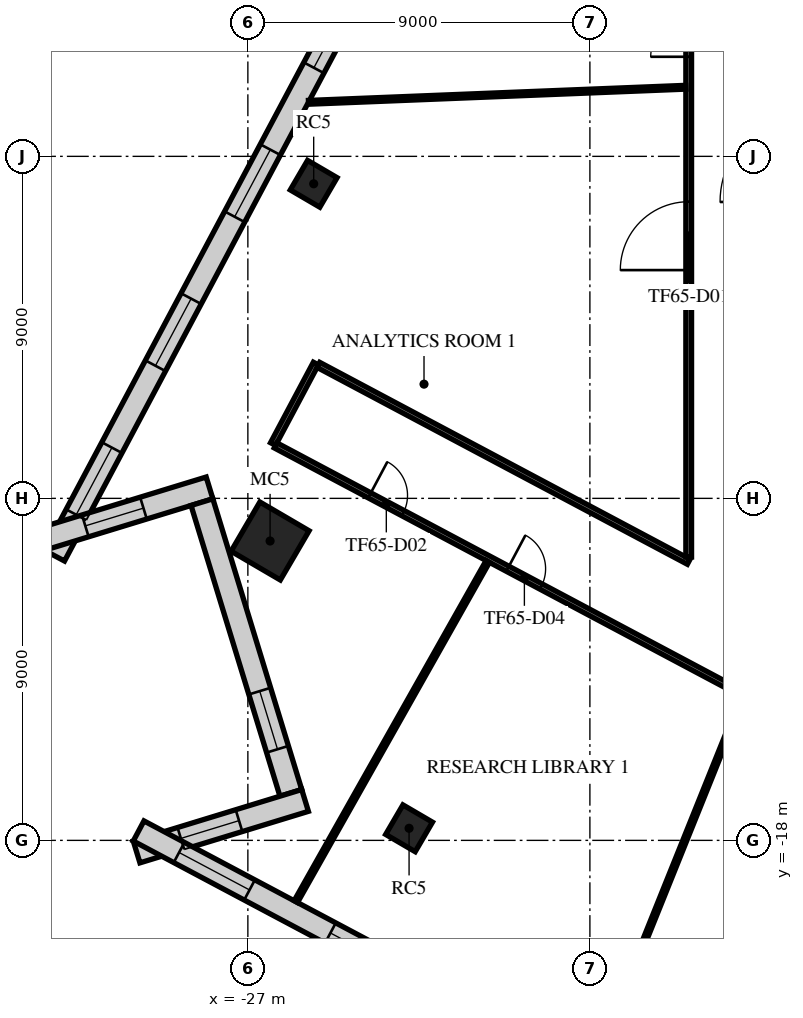
"""IFC4 building model, lengths in metres.
Left out: names, types, materials, properties, quantities, classifications, styles, units other than length and angle.
Written with IfcOpenShell. Run it as: python <this file> out.ifc"""

import sys

from ifc_helpers import new_model, si_unit, direction, frame, frame_2d, origin, origin_2d, place, context, subcontext, project, spatial, rectangle, extrude, element, fill, save


model = new_model("IFC4")
c1 = context("Model", 3, precision=1e-05, world=origin(), true_north=direction((0.0, 1.0)))
c2 = subcontext(c1, "Body", "Model", "MODEL_VIEW")
j1 = project(units=[si_unit("LENGTHUNIT", "METRE"), si_unit("PLANEANGLEUNIT", "RADIAN")], contexts=[c1])
p1 = place(None, origin())
s1 = spatial("IfcSite", under=j1, at=p1, CompositionType="ELEMENT")
p2 = place(p1, origin())
s2 = spatial("IfcBuilding", under=s1, at=p2, CompositionType="ELEMENT")
p3 = place(p2, frame((0.0, 0.0, 274.9)))
s3 = spatial("IfcBuildingStorey", under=s2, at=p3, CompositionType="ELEMENT", Elevation=274.9)
p4 = place(p3, frame((-25.268, -0.722, 0.0), z_axis=(0.0, 0.0, 1.0), x_axis=(0.504643651291, 0.863327739165, 0.0)))
e1 = element("IfcColumn", 1, at=p4, inside=s3, PredefinedType="COLUMN", context=c2, shape_type="SweptSolid", body=[
    extrude(rectangle(XDim=0.9, YDim=0.9, at=origin_2d()), origin(), (0.0, 0.0, 1.0), 4.0),
])
p5 = place(p3, frame((-26.415, -10.122, 0.0), z_axis=(0.0, 0.0, 1.0), x_axis=(0.504643651291, 0.863327739165, 0.0)))
e2 = element("IfcColumn", 2, at=p5, inside=s3, PredefinedType="COLUMN", context=c2, shape_type="SweptSolid", body=[
    extrude(rectangle(XDim=1.5, YDim=1.5, at=origin_2d()), origin(), (0.0, 0.0, 1.0), 4.0),
])
p6 = place(p3, frame((-22.758, -17.682, 0.0), z_axis=(0.0, 0.0, 1.0), x_axis=(0.504643651291, 0.863327739165, 0.0)))
e3 = element("IfcColumn", 3, at=p6, inside=s3, PredefinedType="COLUMN", context=c2, shape_type="SweptSolid", body=[
    extrude(rectangle(XDim=0.9, YDim=0.9, at=origin_2d()), origin(), (0.0, 0.0, 1.0), 4.0),
])
p7 = place(p3, frame((-9.159, 32.618, 0.0), z_axis=(0.0, 0.0, 1.0), x_axis=(-0.469470468388, -0.88294817476, 0.0)))
e4 = element("IfcWall", 4, at=p7, inside=s3, PredefinedType="STANDARD", context=c2, shape_type="SweptSolid", body=[
    extrude(rectangle(XDim=48.843, YDim=0.6, at=frame_2d((24.422, 0.0))), origin(), (0.0, 0.0, 1.0), 3.64),
])
p8 = place(p7, frame((1.22, 0.0, 0.9)))
e5 = element("IfcOpeningElement", 5, at=p8, cuts=e4, PredefinedType="OPENING", context=c2, shape_type="SweptSolid", body=[
    extrude(rectangle(XDim=2.0, YDim=2.1, at=frame_2d((1.0, 1.05))), frame((0.0, 0.31, 0.0), z_axis=(0.0, -1.0, 0.0), x_axis=(1.0, 0.0, 0.0)), (0.0, 0.0, 1.0), 0.62),
])
p9 = place(p7, frame((5.66, 0.0, 0.9)))
e6 = element("IfcOpeningElement", 6, at=p9, cuts=e4, PredefinedType="OPENING", context=c2, shape_type="SweptSolid", body=[
    extrude(rectangle(XDim=2.0, YDim=2.1, at=frame_2d((1.0, 1.05))), frame((0.0, 0.31, 0.0), z_axis=(0.0, -1.0, 0.0), x_axis=(1.0, 0.0, 0.0)), (0.0, 0.0, 1.0), 0.62),
])
p10 = place(p7, frame((10.101, 0.0, 0.9)))
e7 = element("IfcOpeningElement", 7, at=p10, cuts=e4, PredefinedType="OPENING", context=c2, shape_type="SweptSolid", body=[
    extrude(rectangle(XDim=2.0, YDim=2.1, at=frame_2d((1.0, 1.05))), frame((0.0, 0.31, 0.0), z_axis=(0.0, -1.0, 0.0), x_axis=(1.0, 0.0, 0.0)), (0.0, 0.0, 1.0), 0.62),
])
p11 = place(p7, frame((14.541, 0.0, 0.9)))
e8 = element("IfcOpeningElement", 8, at=p11, cuts=e4, PredefinedType="OPENING", context=c2, shape_type="SweptSolid", body=[
    extrude(rectangle(XDim=2.0, YDim=2.1, at=frame_2d((1.0, 1.05))), frame((0.0, 0.31, 0.0), z_axis=(0.0, -1.0, 0.0), x_axis=(1.0, 0.0, 0.0)), (0.0, 0.0, 1.0), 0.62),
])
p12 = place(p7, frame((18.981, 0.0, 0.9)))
e9 = element("IfcOpeningElement", 9, at=p12, cuts=e4, PredefinedType="OPENING", context=c2, shape_type="SweptSolid", body=[
    extrude(rectangle(XDim=2.0, YDim=2.1, at=frame_2d((1.0, 1.05))), frame((0.0, 0.31, 0.0), z_axis=(0.0, -1.0, 0.0), x_axis=(1.0, 0.0, 0.0)), (0.0, 0.0, 1.0), 0.62),
])
p13 = place(p7, frame((23.422, 0.0, 0.9)))
e10 = element("IfcOpeningElement", 10, at=p13, cuts=e4, PredefinedType="OPENING", context=c2, shape_type="SweptSolid", body=[
    extrude(rectangle(XDim=2.0, YDim=2.1, at=frame_2d((1.0, 1.05))), frame((0.0, 0.31, 0.0), z_axis=(0.0, -1.0, 0.0), x_axis=(1.0, 0.0, 0.0)), (0.0, 0.0, 1.0), 0.62),
])
p14 = place(p7, frame((27.862, 0.0, 0.9)))
e11 = element("IfcOpeningElement", 11, at=p14, cuts=e4, PredefinedType="OPENING", context=c2, shape_type="SweptSolid", body=[
    extrude(rectangle(XDim=2.0, YDim=2.1, at=frame_2d((1.0, 1.05))), frame((0.0, 0.31, 0.0), z_axis=(0.0, -1.0, 0.0), x_axis=(1.0, 0.0, 0.0)), (0.0, 0.0, 1.0), 0.62),
])
p15 = place(p7, frame((32.302, 0.0, 0.9)))
e12 = element("IfcOpeningElement", 12, at=p15, cuts=e4, PredefinedType="OPENING", context=c2, shape_type="SweptSolid", body=[
    extrude(rectangle(XDim=2.0, YDim=2.1, at=frame_2d((1.0, 1.05))), frame((0.0, 0.31, 0.0), z_axis=(0.0, -1.0, 0.0), x_axis=(1.0, 0.0, 0.0)), (0.0, 0.0, 1.0), 0.62),
])
p16 = place(p7, frame((36.742, 0.0, 0.9)))
e13 = element("IfcOpeningElement", 13, at=p16, cuts=e4, PredefinedType="OPENING", context=c2, shape_type="SweptSolid", body=[
    extrude(rectangle(XDim=2.0, YDim=2.1, at=frame_2d((1.0, 1.05))), frame((0.0, 0.31, 0.0), z_axis=(0.0, -1.0, 0.0), x_axis=(1.0, 0.0, 0.0)), (0.0, 0.0, 1.0), 0.62),
])
p17 = place(p7, frame((41.183, 0.0, 0.9)))
e14 = element("IfcOpeningElement", 14, at=p17, cuts=e4, PredefinedType="OPENING", context=c2, shape_type="SweptSolid", body=[
    extrude(rectangle(XDim=2.0, YDim=2.1, at=frame_2d((1.0, 1.05))), frame((0.0, 0.31, 0.0), z_axis=(0.0, -1.0, 0.0), x_axis=(1.0, 0.0, 0.0)), (0.0, 0.0, 1.0), 0.62),
])
p18 = place(p7, frame((45.623, 0.0, 0.9)))
e15 = element("IfcOpeningElement", 15, at=p18, cuts=e4, PredefinedType="OPENING", context=c2, shape_type="SweptSolid", body=[
    extrude(rectangle(XDim=2.0, YDim=2.1, at=frame_2d((1.0, 1.05))), frame((0.0, 0.31, 0.0), z_axis=(0.0, -1.0, 0.0), x_axis=(1.0, 0.0, 0.0)), (0.0, 0.0, 1.0), 0.62),
])
p19 = place(p3, frame((-32.442, -10.08, 0.0), z_axis=(0.0, 0.0, 1.0), x_axis=(0.956306994041, 0.2923643842, 0.0)))
e16 = element("IfcWall", 16, at=p19, inside=s3, PredefinedType="STANDARD", context=c2, shape_type="SweptSolid", body=[
    extrude(rectangle(XDim=4.635, YDim=0.6, at=frame_2d((2.318, 0.0))), origin(), (0.0, 0.0, 1.0), 3.64),
])
p20 = place(p19, frame((1.218, 0.0, 0.9)))
e17 = element("IfcOpeningElement", 17, at=p20, cuts=e16, PredefinedType="OPENING", context=c2, shape_type="SweptSolid", body=[
    extrude(rectangle(XDim=1.6, YDim=2.1, at=frame_2d((0.8, 1.05))), frame((0.0, 0.31, 0.0), z_axis=(0.0, -1.0, 0.0), x_axis=(1.0, 0.0, 0.0)), (0.0, 0.0, 1.0), 0.62),
])
p21 = place(p3, frame((-28.208, -9.1, 0.0), z_axis=(0.0, 0.0, 1.0), x_axis=(0.292389102139, -0.956299436866, 0.0)))
e18 = element("IfcWall", 18, at=p21, inside=s3, PredefinedType="STANDARD", context=c2, shape_type="SweptSolid", body=[
    extrude(rectangle(XDim=8.0, YDim=0.6, at=frame_2d((4.0, 0.0))), origin(), (0.0, 0.0, 1.0), 3.64),
])
p22 = place(p21, frame((5.2, 0.0, 0.9)))
e19 = element("IfcOpeningElement", 19, at=p22, cuts=e18, PredefinedType="OPENING", context=c2, shape_type="SweptSolid", body=[
    extrude(rectangle(XDim=1.6, YDim=2.1, at=frame_2d((0.8, 1.05))), frame((0.0, 0.31, 0.0), z_axis=(0.0, -1.0, 0.0), x_axis=(1.0, 0.0, 0.0)), (0.0, 0.0, 1.0), 0.62),
])
p23 = place(p3, frame((-25.495, -16.949, 0.0), z_axis=(0.0, 0.0, 1.0), x_axis=(-0.956292267386, -0.292412549899, 0.0)))
e20 = element("IfcWall", 20, at=p23, inside=s3, PredefinedType="STANDARD", context=c2, shape_type="SweptSolid", body=[
    extrude(rectangle(XDim=4.635, YDim=0.6, at=frame_2d((2.318, 0.0))), origin(), (0.0, 0.0, 1.0), 3.64),
])
p24 = place(p23, frame((1.818, 0.0, 0.9)))
e21 = element("IfcOpeningElement", 21, at=p24, cuts=e20, PredefinedType="OPENING", context=c2, shape_type="SweptSolid", body=[
    extrude(rectangle(XDim=1.6, YDim=2.1, at=frame_2d((0.8, 1.05))), frame((0.0, 0.31, 0.0), z_axis=(0.0, -1.0, 0.0), x_axis=(1.0, 0.0, 0.0)), (0.0, 0.0, 1.0), 0.62),
])
p25 = place(p3, frame((-29.875, -17.753, 0.0), z_axis=(0.0, 0.0, 1.0), x_axis=(0.882945726539, -0.469475072806, 0.0)))
e22 = element("IfcWall", 22, at=p25, inside=s3, PredefinedType="STANDARD", context=c2, shape_type="SweptSolid", body=[
    extrude(rectangle(XDim=36.086, YDim=0.6, at=frame_2d((18.043, 0.0))), origin(), (0.0, 0.0, 1.0), 3.64),
])
p26 = place(p25, frame((1.205, 0.0, 0.9)))
e23 = element("IfcOpeningElement", 23, at=p26, cuts=e22, PredefinedType="OPENING", context=c2, shape_type="SweptSolid", body=[
    extrude(rectangle(XDim=2.1, YDim=2.1, at=frame_2d((1.05, 1.05))), frame((0.0, 0.31, 0.0), z_axis=(0.0, -1.0, 0.0), x_axis=(1.0, 0.0, 0.0)), (0.0, 0.0, 1.0), 0.62),
])
p27 = place(p25, frame((5.716, 0.0, 0.9)))
e24 = element("IfcOpeningElement", 24, at=p27, cuts=e22, PredefinedType="OPENING", context=c2, shape_type="SweptSolid", body=[
    extrude(rectangle(XDim=2.1, YDim=2.1, at=frame_2d((1.05, 1.05))), frame((0.0, 0.31, 0.0), z_axis=(0.0, -1.0, 0.0), x_axis=(1.0, 0.0, 0.0)), (0.0, 0.0, 1.0), 0.62),
])
p28 = place(p25, frame((10.227, 0.0, 0.9)))
e25 = element("IfcOpeningElement", 25, at=p28, cuts=e22, PredefinedType="OPENING", context=c2, shape_type="SweptSolid", body=[
    extrude(rectangle(XDim=2.1, YDim=2.1, at=frame_2d((1.05, 1.05))), frame((0.0, 0.31, 0.0), z_axis=(0.0, -1.0, 0.0), x_axis=(1.0, 0.0, 0.0)), (0.0, 0.0, 1.0), 0.62),
])
p29 = place(p25, frame((14.738, 0.0, 0.9)))
e26 = element("IfcOpeningElement", 26, at=p29, cuts=e22, PredefinedType="OPENING", context=c2, shape_type="SweptSolid", body=[
    extrude(rectangle(XDim=2.1, YDim=2.1, at=frame_2d((1.05, 1.05))), frame((0.0, 0.31, 0.0), z_axis=(0.0, -1.0, 0.0), x_axis=(1.0, 0.0, 0.0)), (0.0, 0.0, 1.0), 0.62),
])
p30 = place(p25, frame((19.249, 0.0, 0.9)))
e27 = element("IfcOpeningElement", 27, at=p30, cuts=e22, PredefinedType="OPENING", context=c2, shape_type="SweptSolid", body=[
    extrude(rectangle(XDim=2.1, YDim=2.1, at=frame_2d((1.05, 1.05))), frame((0.0, 0.31, 0.0), z_axis=(0.0, -1.0, 0.0), x_axis=(1.0, 0.0, 0.0)), (0.0, 0.0, 1.0), 0.62),
])
p31 = place(p25, frame((23.759, 0.0, 0.9)))
e28 = element("IfcOpeningElement", 28, at=p31, cuts=e22, PredefinedType="OPENING", context=c2, shape_type="SweptSolid", body=[
    extrude(rectangle(XDim=2.1, YDim=2.1, at=frame_2d((1.05, 1.05))), frame((0.0, 0.31, 0.0), z_axis=(0.0, -1.0, 0.0), x_axis=(1.0, 0.0, 0.0)), (0.0, 0.0, 1.0), 0.62),
])
p32 = place(p25, frame((28.27, 0.0, 0.9)))
e29 = element("IfcOpeningElement", 29, at=p32, cuts=e22, PredefinedType="OPENING", context=c2, shape_type="SweptSolid", body=[
    extrude(rectangle(XDim=2.1, YDim=2.1, at=frame_2d((1.05, 1.05))), frame((0.0, 0.31, 0.0), z_axis=(0.0, -1.0, 0.0), x_axis=(1.0, 0.0, 0.0)), (0.0, 0.0, 1.0), 0.62),
])
p33 = place(p25, frame((32.781, 0.0, 0.9)))
e30 = element("IfcOpeningElement", 30, at=p33, cuts=e22, PredefinedType="OPENING", context=c2, shape_type="SweptSolid", body=[
    extrude(rectangle(XDim=2.1, YDim=2.1, at=frame_2d((1.05, 1.05))), frame((0.0, 0.31, 0.0), z_axis=(0.0, -1.0, 0.0), x_axis=(1.0, 0.0, 0.0)), (0.0, 0.0, 1.0), 0.62),
])
p34 = place(p3, frame((-26.337, -7.571, 0.0), z_axis=(0.0, 0.0, 1.0), x_axis=(0.469531998299, 0.882915456073, 0.0)))
e31 = element("IfcWall", 31, at=p34, inside=s3, PredefinedType="PARTITIONING", context=c2, shape_type="SweptSolid", body=[
    extrude(rectangle(XDim=2.4, YDim=0.15, at=frame_2d((1.2, 0.0))), origin(), (0.0, 0.0, 1.0), 3.04),
])
p35 = place(p3, frame((-26.271, -7.606, 0.0), z_axis=(0.0, 0.0, 1.0), x_axis=(0.882946860375, -0.469472940385, 0.0)))
e32 = element("IfcWall", 32, at=p35, inside=s3, PredefinedType="PARTITIONING", context=c2, shape_type="SweptSolid", body=[
    extrude(rectangle(XDim=39.325, YDim=0.15, at=frame_2d((19.662, 0.0))), origin(), (0.0, 0.0, 1.0), 3.04),
])
p36 = place(p35, frame((2.8, 0.0, 0.0)))
e33 = element("IfcOpeningElement", 33, at=p36, cuts=e32, PredefinedType="OPENING", context=c2, shape_type="SweptSolid", body=[
    extrude(rectangle(XDim=1.0, YDim=2.1, at=frame_2d((0.5, 1.05))), frame((0.0, 0.085, 0.0), z_axis=(0.0, -1.0, 0.0), x_axis=(1.0, 0.0, 0.0)), (0.0, 0.0, 1.0), 0.17),
])
p37 = place(p35, frame((6.915, 0.0, 0.0)))
e34 = element("IfcOpeningElement", 34, at=p37, cuts=e32, PredefinedType="OPENING", context=c2, shape_type="SweptSolid", body=[
    extrude(rectangle(XDim=1.0, YDim=2.1, at=frame_2d((0.5, 1.05))), frame((0.0, 0.085, 0.0), z_axis=(0.0, -1.0, 0.0), x_axis=(1.0, 0.0, 0.0)), (0.0, 0.0, 1.0), 0.17),
])
p38 = place(p35, frame((14.499, 0.0, 0.0)))
e35 = element("IfcOpeningElement", 35, at=p38, cuts=e32, PredefinedType="OPENING", context=c2, shape_type="SweptSolid", body=[
    extrude(rectangle(XDim=1.0, YDim=2.1, at=frame_2d((0.5, 1.05))), frame((0.0, 0.085, 0.0), z_axis=(0.0, -1.0, 0.0), x_axis=(1.0, 0.0, 0.0)), (0.0, 0.0, 1.0), 0.17),
])
p39 = place(p35, frame((25.785, 0.0, 0.0)))
e36 = element("IfcOpeningElement", 36, at=p39, cuts=e32, PredefinedType="OPENING", context=c2, shape_type="SweptSolid", body=[
    extrude(rectangle(XDim=1.0, YDim=2.1, at=frame_2d((0.5, 1.05))), frame((0.0, 0.085, 0.0), z_axis=(0.0, -1.0, 0.0), x_axis=(1.0, 0.0, 0.0)), (0.0, 0.0, 1.0), 0.17),
])
p40 = place(p35, frame((37.741, 0.0, 0.0)))
e37 = element("IfcOpeningElement", 37, at=p40, cuts=e32, PredefinedType="OPENING", context=c2, shape_type="SweptSolid", body=[
    extrude(rectangle(XDim=1.0, YDim=2.1, at=frame_2d((0.5, 1.05))), frame((0.0, 0.085, 0.0), z_axis=(0.0, -1.0, 0.0), x_axis=(1.0, 0.0, 0.0)), (0.0, 0.0, 1.0), 0.17),
])
p41 = place(p3, frame((-25.144, -5.487, 0.0), z_axis=(0.0, 0.0, 1.0), x_axis=(0.882957268676, -0.469453364769, 0.0)))
e38 = element("IfcWall", 38, at=p41, inside=s3, PredefinedType="PARTITIONING", context=c2, shape_type="SweptSolid", body=[
    extrude(rectangle(XDim=11.036, YDim=0.15, at=frame_2d((5.518, 0.0))), origin(), (0.0, 0.0, 1.0), 3.24),
])
p42 = place(p3, frame((-15.4, -10.543, 0.0), z_axis=(0.0, 0.0, 1.0), x_axis=(0.0, 1.0, 0.0)))
e39 = element("IfcWall", 39, at=p42, inside=s3, PredefinedType="PARTITIONING", context=c2, shape_type="SweptSolid", body=[
    extrude(rectangle(XDim=25.943, YDim=0.15, at=frame_2d((12.972, 0.0))), origin(), (0.0, 0.0, 1.0), 3.24),
])
p43 = place(p42, frame((7.55, 0.0, 0.0)))
e40 = element("IfcOpeningElement", 40, at=p43, cuts=e39, PredefinedType="OPENING", context=c2, shape_type="SweptSolid", body=[
    extrude(rectangle(XDim=1.8, YDim=2.1, at=frame_2d((0.9, 1.05))), frame((0.0, 0.085, 0.0), z_axis=(0.0, -1.0, 0.0), x_axis=(1.0, 0.0, 0.0)), (0.0, 0.0, 1.0), 0.17),
])
p44 = place(p42, frame((13.164, 0.0, 0.0)))
e41 = element("IfcOpeningElement", 41, at=p44, cuts=e39, PredefinedType="OPENING", context=c2, shape_type="SweptSolid", body=[
    extrude(rectangle(XDim=1.0, YDim=2.1, at=frame_2d((0.5, 1.05))), frame((0.0, 0.085, 0.0), z_axis=(0.0, -1.0, 0.0), x_axis=(1.0, 0.0, 0.0)), (0.0, 0.0, 1.0), 0.17),
])
p45 = place(p42, frame((22.088, 0.0, 0.0)))
e42 = element("IfcOpeningElement", 42, at=p45, cuts=e39, PredefinedType="OPENING", context=c2, shape_type="SweptSolid", body=[
    extrude(rectangle(XDim=1.0, YDim=2.1, at=frame_2d((0.5, 1.05))), frame((0.0, 0.085, 0.0), z_axis=(0.0, -1.0, 0.0), x_axis=(1.0, 0.0, 0.0)), (0.0, 0.0, 1.0), 0.17),
])
p46 = place(p3, frame((-25.737, -19.611, 0.0), z_axis=(0.0, 0.0, 1.0), x_axis=(0.491415925423, 0.870925018725, 0.0)))
e43 = element("IfcWall", 43, at=p46, inside=s3, PredefinedType="PARTITIONING", context=c2, shape_type="SweptSolid", body=[
    extrude(rectangle(XDim=10.276, YDim=0.1, at=frame_2d((5.138, 0.0))), origin(), (0.0, 0.0, 1.0), 3.04),
])
p47 = place(p3, frame((-25.404, 1.422, 0.0), z_axis=(0.0, 0.0, 1.0), x_axis=(0.999201390474, 0.039957243081, 0.0)))
e44 = element("IfcWall", 44, at=p47, inside=s3, PredefinedType="PARTITIONING", context=c2, shape_type="SweptSolid", body=[
    extrude(rectangle(XDim=9.935, YDim=0.1, at=frame_2d((4.967, 0.0))), origin(), (0.0, 0.0, 1.0), 3.04),
])
p48 = place(p3, frame((-17.84, -23.81, 0.0), z_axis=(0.0, 0.0, 1.0), x_axis=(0.373322071297, 0.927701800732, 0.0)))
e45 = element("IfcWall", 45, at=p48, inside=s3, PredefinedType="PARTITIONING", context=c2, shape_type="SweptSolid", body=[
    extrude(rectangle(XDim=10.326, YDim=0.1, at=frame_2d((5.163, 0.0))), origin(), (0.0, 0.0, 1.0), 3.04),
])
p49 = place(p15, origin())
e46 = element("IfcWindow", 46, at=p49, inside=s3, PartitioningType="SINGLE_PANEL", PredefinedType="WINDOW", context=c2, shape_type="SweptSolid", body=[
    extrude(rectangle(XDim=2.0, YDim=2.1, at=frame_2d((1.0, 1.05))), frame((0.0, 0.03, 0.0), z_axis=(0.0, -1.0, 0.0), x_axis=(1.0, 0.0, 0.0)), (0.0, 0.0, 1.0), 0.06),
])
fill(e12, e46)
p50 = place(p16, origin())
e47 = element("IfcWindow", 47, at=p50, inside=s3, PartitioningType="SINGLE_PANEL", PredefinedType="WINDOW", context=c2, shape_type="SweptSolid", body=[
    extrude(rectangle(XDim=2.0, YDim=2.1, at=frame_2d((1.0, 1.05))), frame((0.0, 0.03, 0.0), z_axis=(0.0, -1.0, 0.0), x_axis=(1.0, 0.0, 0.0)), (0.0, 0.0, 1.0), 0.06),
])
fill(e13, e47)
p51 = place(p17, origin())
e48 = element("IfcWindow", 48, at=p51, inside=s3, PartitioningType="SINGLE_PANEL", PredefinedType="WINDOW", context=c2, shape_type="SweptSolid", body=[
    extrude(rectangle(XDim=2.0, YDim=2.1, at=frame_2d((1.0, 1.05))), frame((0.0, 0.03, 0.0), z_axis=(0.0, -1.0, 0.0), x_axis=(1.0, 0.0, 0.0)), (0.0, 0.0, 1.0), 0.06),
])
fill(e14, e48)
p52 = place(p18, origin())
e49 = element("IfcWindow", 49, at=p52, inside=s3, PartitioningType="SINGLE_PANEL", PredefinedType="WINDOW", context=c2, shape_type="SweptSolid", body=[
    extrude(rectangle(XDim=2.0, YDim=2.1, at=frame_2d((1.0, 1.05))), frame((0.0, 0.03, 0.0), z_axis=(0.0, -1.0, 0.0), x_axis=(1.0, 0.0, 0.0)), (0.0, 0.0, 1.0), 0.06),
])
fill(e15, e49)
p53 = place(p20, origin())
e50 = element("IfcWindow", 50, at=p53, inside=s3, PartitioningType="SINGLE_PANEL", PredefinedType="WINDOW", context=c2, shape_type="SweptSolid", body=[
    extrude(rectangle(XDim=1.6, YDim=2.1, at=frame_2d((0.8, 1.05))), frame((0.0, 0.03, 0.0), z_axis=(0.0, -1.0, 0.0), x_axis=(1.0, 0.0, 0.0)), (0.0, 0.0, 1.0), 0.06),
])
fill(e17, e50)
p54 = place(p22, origin())
e51 = element("IfcWindow", 51, at=p54, inside=s3, PartitioningType="SINGLE_PANEL", PredefinedType="WINDOW", context=c2, shape_type="SweptSolid", body=[
    extrude(rectangle(XDim=1.6, YDim=2.1, at=frame_2d((0.8, 1.05))), frame((0.0, 0.03, 0.0), z_axis=(0.0, -1.0, 0.0), x_axis=(1.0, 0.0, 0.0)), (0.0, 0.0, 1.0), 0.06),
])
fill(e19, e51)
p55 = place(p24, origin())
e52 = element("IfcWindow", 52, at=p55, inside=s3, PartitioningType="SINGLE_PANEL", PredefinedType="WINDOW", context=c2, shape_type="SweptSolid", body=[
    extrude(rectangle(XDim=1.6, YDim=2.1, at=frame_2d((0.8, 1.05))), frame((0.0, 0.03, 0.0), z_axis=(0.0, -1.0, 0.0), x_axis=(1.0, 0.0, 0.0)), (0.0, 0.0, 1.0), 0.06),
])
fill(e21, e52)
p56 = place(p26, origin())
e53 = element("IfcWindow", 53, at=p56, inside=s3, PartitioningType="SINGLE_PANEL", PredefinedType="WINDOW", context=c2, shape_type="SweptSolid", body=[
    extrude(rectangle(XDim=2.1, YDim=2.1, at=frame_2d((1.05, 1.05))), frame((0.0, 0.03, 0.0), z_axis=(0.0, -1.0, 0.0), x_axis=(1.0, 0.0, 0.0)), (0.0, 0.0, 1.0), 0.06),
])
fill(e23, e53)
p57 = place(p27, origin())
e54 = element("IfcWindow", 54, at=p57, inside=s3, PartitioningType="SINGLE_PANEL", PredefinedType="WINDOW", context=c2, shape_type="SweptSolid", body=[
    extrude(rectangle(XDim=2.1, YDim=2.1, at=frame_2d((1.05, 1.05))), frame((0.0, 0.03, 0.0), z_axis=(0.0, -1.0, 0.0), x_axis=(1.0, 0.0, 0.0)), (0.0, 0.0, 1.0), 0.06),
])
fill(e24, e54)
p58 = place(p43, origin())
e55 = element("IfcDoor", 55, at=p58, inside=s3, OperationType="DOUBLE_DOOR_SINGLE_SWING", PredefinedType="DOOR", context=c2, shape_type="SweptSolid", body=[
    extrude(rectangle(XDim=1.8, YDim=2.1, at=frame_2d((0.9, 1.05))), frame((0.0, 0.025, 0.0), z_axis=(0.0, -1.0, 0.0), x_axis=(1.0, 0.0, 0.0)), (0.0, 0.0, 1.0), 0.05),
])
fill(e40, e55)
p59 = place(p36, frame((1.0, 0.0, 0.0), z_axis=(0.0, 0.0, 1.0), x_axis=(-1.0, 0.0, 0.0)))
e56 = element("IfcDoor", 56, at=p59, inside=s3, OperationType="SINGLE_SWING_LEFT", PredefinedType="DOOR", context=c2, shape_type="SweptSolid", body=[
    extrude(rectangle(XDim=1.0, YDim=2.1, at=frame_2d((0.5, 1.05))), frame((0.0, 0.025, 0.0), z_axis=(0.0, -1.0, 0.0), x_axis=(1.0, 0.0, 0.0)), (0.0, 0.0, 1.0), 0.05),
])
fill(e33, e56)
p60 = place(p44, origin())
e57 = element("IfcDoor", 57, at=p60, inside=s3, OperationType="SINGLE_SWING_RIGHT", PredefinedType="DOOR", context=c2, shape_type="SweptSolid", body=[
    extrude(rectangle(XDim=1.0, YDim=2.1, at=frame_2d((0.5, 1.05))), frame((0.0, 0.025, 0.0), z_axis=(0.0, -1.0, 0.0), x_axis=(1.0, 0.0, 0.0)), (0.0, 0.0, 1.0), 0.05),
])
fill(e41, e57)
p61 = place(p37, frame((1.0, 0.0, 0.0), z_axis=(0.0, 0.0, 1.0), x_axis=(-1.0, 0.0, 0.0)))
e58 = element("IfcDoor", 58, at=p61, inside=s3, OperationType="SINGLE_SWING_RIGHT", PredefinedType="DOOR", context=c2, shape_type="SweptSolid", body=[
    extrude(rectangle(XDim=1.0, YDim=2.1, at=frame_2d((0.5, 1.05))), frame((0.0, 0.025, 0.0), z_axis=(0.0, -1.0, 0.0), x_axis=(1.0, 0.0, 0.0)), (0.0, 0.0, 1.0), 0.05),
])
fill(e34, e58)
save(model, sys.argv[1])
